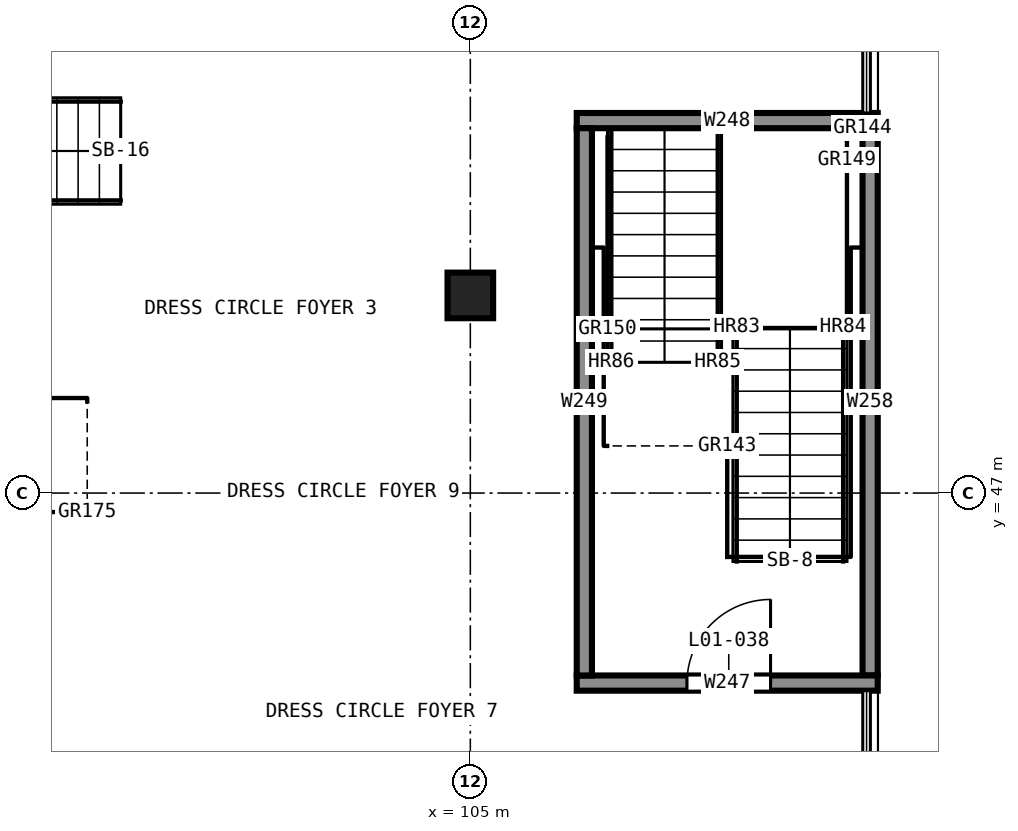
"""IFC4 building model, lengths in metres.
Left out: names, types, materials, properties, quantities, classifications, styles, units other than length and angle.
Written with IfcOpenShell. Run it as: python <this file> out.ifc"""

import sys

from ifc_helpers import new_model, si_unit, direction, frame, frame_2d, origin, origin_2d, place, context, subcontext, project, spatial, rectangle, extrude, element, fill, save


model = new_model("IFC4")
c1 = context("Model", 3, precision=1e-05, world=origin(), true_north=direction((0.0, 1.0)))
c2 = subcontext(c1, "Body", "Model", "MODEL_VIEW")
j1 = project(units=[si_unit("LENGTHUNIT", "METRE"), si_unit("PLANEANGLEUNIT", "RADIAN")], contexts=[c1])
p1 = place(None, origin())
s1 = spatial("IfcSite", under=j1, at=p1, CompositionType="ELEMENT")
p2 = place(p1, origin())
s2 = spatial("IfcBuilding", under=s1, at=p2, CompositionType="ELEMENT")
p3 = place(p2, frame((0.0, 0.0, 5.5)))
s3 = spatial("IfcBuildingStorey", under=s2, at=p3, CompositionType="ELEMENT", Elevation=5.5)
p4 = place(p3, frame((106.4, 44.5, 0.0), z_axis=(0.0, 0.0, 1.0), x_axis=(1.0, 0.0, 0.0)))
e1 = element("IfcWall", 1, at=p4, inside=s3, PredefinedType="SHEAR", context=c2, shape_type="SweptSolid", body=[
    extrude(rectangle(XDim=3.96, YDim=0.2, at=frame_2d((1.98, 0.0))), origin(), (0.0, 0.0, 1.0), 4.0),
])
p5 = place(p4, frame((1.45, 0.0, 0.0)))
e2 = element("IfcOpeningElement", 2, at=p5, cuts=e1, PredefinedType="OPENING", context=c2, shape_type="SweptSolid", body=[
    extrude(rectangle(XDim=1.1, YDim=2.1, at=frame_2d((0.55, 1.05))), frame((0.0, 0.11, 0.0), z_axis=(0.0, -1.0, 0.0), x_axis=(1.0, 0.0, 0.0)), (0.0, 0.0, 1.0), 0.22),
])
p6 = place(p3, frame((110.36, 51.9, 0.0), z_axis=(0.0, 0.0, 1.0), x_axis=(-1.0, 0.0, 0.0)))
e3 = element("IfcWall", 3, at=p6, inside=s3, PredefinedType="SHEAR", context=c2, shape_type="SweptSolid", body=[
    extrude(rectangle(XDim=3.96, YDim=0.2, at=frame_2d((1.98, 0.0))), origin(), (0.0, 0.0, 1.0), 4.0),
])
for number, where, z_axis, x_axis in (
    (4, (106.5, 51.8, 0.0), (0.0, 0.0, 1.0), (0.0, -1.0, 0.0)),
    (5, (110.26, 44.6, 0.0), (0.0, 0.0, 1.0), (0.0, 1.0, 0.0)),
):
    element("IfcWall", number, at=place(p3, frame(where, z_axis=z_axis, x_axis=x_axis)), inside=s3, PredefinedType="SHEAR", context=c2, shape_type="SweptSolid", body=[
        extrude(rectangle(XDim=7.2, YDim=0.2, at=frame_2d((3.6, 0.0))), origin(), (0.0, 0.0, 1.0), 4.0),
    ])
p7 = place(p3, frame((105.0, 49.6, 0.0), z_axis=(0.0, 0.0, 1.0), x_axis=(1.0, 0.0, 0.0)))
e6 = element("IfcColumn", 6, at=p7, inside=s3, PredefinedType="COLUMN", context=c2, shape_type="SweptSolid", body=[
    extrude(rectangle(XDim=0.6, YDim=0.6, at=origin_2d()), origin(), (0.0, 0.0, 1.0), 4.0),
])
p8 = place(p5, origin())
e7 = element("IfcDoor", 7, at=p8, inside=s3, OperationType="SINGLE_SWING_LEFT", PredefinedType="DOOR", context=c2, shape_type="SweptSolid", body=[
    extrude(rectangle(XDim=1.1, YDim=2.1, at=frame_2d((0.55, 1.05))), frame((0.0, 0.025, 0.0), z_axis=(0.0, -1.0, 0.0), x_axis=(1.0, 0.0, 0.0)), (0.0, 0.0, 1.0), 0.05),
])
fill(e2, e7)
save(model, sys.argv[1])
